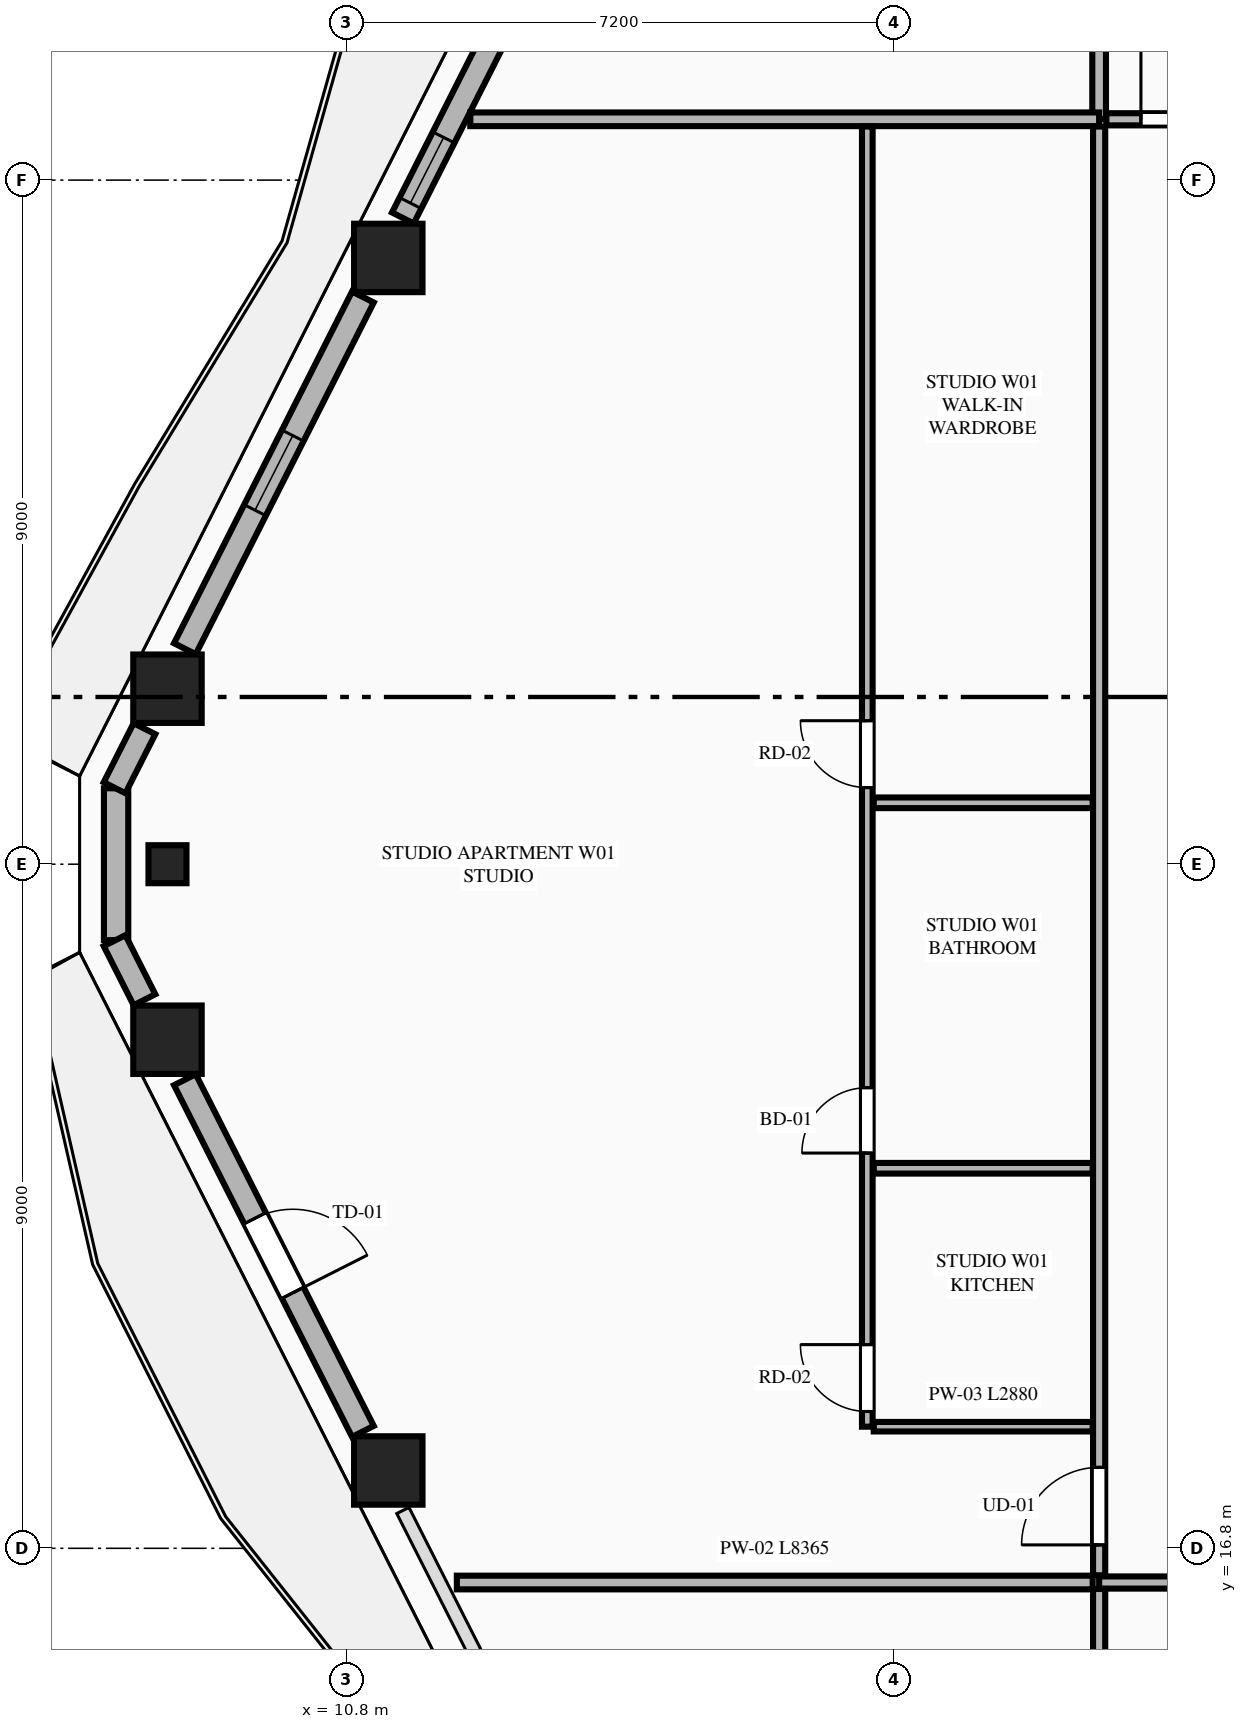
"""IFC4 building model, lengths in metres.
Left out: names, types, materials, properties, quantities, classifications, styles, units other than length and angle.
Written with IfcOpenShell. Run it as: python <this file> out.ifc"""

import sys

from ifc_helpers import new_model, si_unit, direction, frame, frame_2d, origin, origin_2d, place, context, subcontext, project, spatial, rectangle, extrude, element, fill, save


model = new_model("IFC4")
c1 = context("Model", 3, precision=1e-05, world=origin(), true_north=direction((0.0, 1.0)))
c2 = subcontext(c1, "Body", "Model", "MODEL_VIEW")
j1 = project(units=[si_unit("LENGTHUNIT", "METRE"), si_unit("PLANEANGLEUNIT", "RADIAN")], contexts=[c1])
p1 = place(None, origin())
s1 = spatial("IfcSite", under=j1, at=p1, CompositionType="ELEMENT")
p2 = place(p1, origin())
s2 = spatial("IfcBuilding", under=s1, at=p2, CompositionType="ELEMENT")
p3 = place(p2, frame((0.0, 0.0, 167.7)))
s3 = spatial("IfcBuildingStorey", under=s2, at=p3, CompositionType="ELEMENT", Elevation=167.7)
for number, where, z_axis, x_axis in (
    (1, (11.348, 33.776, 0.0), (0.0, 0.0, 1.0), (1.0, 0.0, 0.0)),
    (2, (8.443, 28.109, 0.0), (0.0, 0.0, 1.0), (1.0, 0.0, 0.0)),
    (3, (8.443, 23.491, 0.0), (0.0, 0.0, 1.0), (1.0, 0.0, 0.0)),
    (4, (11.348, 17.824, 0.0), (0.0, 0.0, 1.0), (1.0, 0.0, 0.0)),
):
    element("IfcColumn", number, at=place(p3, frame(where, z_axis=z_axis, x_axis=x_axis)), inside=s3, PredefinedType="COLUMN", context=c2, shape_type="SweptSolid", body=[
        extrude(rectangle(XDim=0.9, YDim=0.9, at=origin_2d()), origin(), (0.0, 0.0, 1.0), 4.2),
    ])
p4 = place(p3, frame((8.443, 25.8, 0.0), z_axis=(0.0, 0.0, 1.0), x_axis=(0.0, -1.0, 0.0)))
e5 = element("IfcColumn", 5, at=p4, inside=s3, PredefinedType="PILASTER", context=c2, shape_type="SweptSolid", body=[
    extrude(rectangle(XDim=0.5, YDim=0.35, at=origin_2d()), origin(), (0.0, 0.0, 1.0), 4.2),
])
p5 = place(p3, frame((7.767, 26.799, 0.0), z_axis=(0.0, 0.0, 1.0), x_axis=(0.0, -1.0, 0.0)))
e6 = element("IfcWall", 6, at=p5, inside=s3, PredefinedType="STANDARD", context=c2, shape_type="SweptSolid", body=[
    extrude(rectangle(XDim=1.998, YDim=0.32, at=frame_2d((0.999, 0.0))), origin(), (0.0, 0.0, 1.0), 4.0),
])
p6 = place(p3, frame((13.982, 39.129, 0.0), z_axis=(0.0, 0.0, 1.0), x_axis=(-0.451414996529, -0.892314126812, 0.0)))
e7 = element("IfcWall", 7, at=p6, inside=s3, PredefinedType="STANDARD", context=c2, shape_type="SweptSolid", body=[
    extrude(rectangle(XDim=5.409, YDim=0.32, at=frame_2d((2.705, 0.0))), origin(), (0.0, 0.0, 1.0), 2.59),
])
p7 = place(p6, frame((1.305, 0.0, 0.0)))
e8 = element("IfcOpeningElement", 8, at=p7, cuts=e7, PredefinedType="OPENING", context=c2, shape_type="SweptSolid", body=[
    extrude(rectangle(XDim=1.1, YDim=2.25, at=frame_2d((0.55, 1.125))), frame((0.0, 0.17, 0.0), z_axis=(0.0, -1.0, 0.0), x_axis=(1.0, 0.0, 0.0)), (0.0, 0.0, 1.0), 0.34),
])
p8 = place(p6, frame((4.222, 0.0, 0.75)))
e9 = element("IfcOpeningElement", 9, at=p8, cuts=e7, PredefinedType="OPENING", context=c2, shape_type="SweptSolid", body=[
    extrude(rectangle(XDim=0.968, YDim=1.56, at=frame_2d((0.484, 0.78))), frame((0.0, 0.17, 0.0), z_axis=(0.0, -1.0, 0.0), x_axis=(1.0, 0.0, 0.0)), (0.0, 0.0, 1.0), 0.34),
])
p9 = place(p3, frame((11.014, 33.262, 0.0), z_axis=(0.0, 0.0, 1.0), x_axis=(-0.451577146935, -0.892232077638, 0.0)))
e10 = element("IfcWall", 10, at=p9, inside=s3, PredefinedType="STANDARD", context=c2, shape_type="SweptSolid", body=[
    extrude(rectangle(XDim=5.186, YDim=0.32, at=frame_2d((2.593, 0.0))), origin(), (0.0, 0.0, 1.0), 2.59),
])
p10 = place(p9, frame((2.043, 0.0, 0.75)))
e11 = element("IfcOpeningElement", 11, at=p10, cuts=e10, PredefinedType="OPENING", context=c2, shape_type="SweptSolid", body=[
    extrude(rectangle(XDim=1.1, YDim=1.69, at=frame_2d((0.55, 0.845))), frame((0.0, 0.17, 0.0), z_axis=(0.0, -1.0, 0.0), x_axis=(1.0, 0.0, 0.0)), (0.0, 0.0, 1.0), 0.34),
])
p11 = place(p3, frame((8.14, 27.583, 0.0), z_axis=(0.0, 0.0, 1.0), x_axis=(-0.451134636701, -0.892455903431, 0.0)))
e12 = element("IfcWall", 12, at=p11, inside=s3, PredefinedType="STANDARD", context=c2, shape_type="SweptSolid", body=[
    extrude(rectangle(XDim=0.871, YDim=0.32, at=frame_2d((0.436, 0.0))), origin(), (0.0, 0.0, 1.0), 4.0),
])
p12 = place(p3, frame((7.747, 24.794, 0.0), z_axis=(0.0, 0.0, 1.0), x_axis=(0.451247548119, -0.892398817971, 0.0)))
e13 = element("IfcWall", 13, at=p12, inside=s3, PredefinedType="STANDARD", context=c2, shape_type="SweptSolid", body=[
    extrude(rectangle(XDim=0.871, YDim=0.32, at=frame_2d((0.435, 0.0))), origin(), (0.0, 0.0, 1.0), 4.0),
])
p13 = place(p3, frame((8.672, 22.965, 0.0), z_axis=(0.0, 0.0, 1.0), x_axis=(0.451558179147, -0.892241677375, 0.0)))
e14 = element("IfcWall", 14, at=p13, inside=s3, PredefinedType="STANDARD", context=c2, shape_type="SweptSolid", body=[
    extrude(rectangle(XDim=5.186, YDim=0.32, at=frame_2d((2.593, 0.0))), origin(), (0.0, 0.0, 1.0), 2.59),
])
p14 = place(p13, frame((2.043, 0.0, 0.0)))
e15 = element("IfcOpeningElement", 15, at=p14, cuts=e14, PredefinedType="OPENING", context=c2, shape_type="SweptSolid", body=[
    extrude(rectangle(XDim=1.1, YDim=2.25, at=frame_2d((0.55, 1.125))), frame((0.0, 0.17, 0.0), z_axis=(0.0, -1.0, 0.0), x_axis=(1.0, 0.0, 0.0)), (0.0, 0.0, 1.0), 0.34),
])
p15 = place(p3, frame((20.7, 16.35, 0.0), z_axis=(0.0, 0.0, 1.0), x_axis=(1.0, 0.0, 0.0)))
e16 = element("IfcWall", 16, at=p15, inside=s3, PredefinedType="PARTITIONING", context=c2, shape_type="SweptSolid", body=[
    extrude(rectangle(XDim=23.4, YDim=0.16, at=frame_2d((11.7, 0.0))), origin(), (0.0, 0.0, 1.0), 4.0),
])
p16 = place(p15, frame((8.518, 0.0, 0.0)))
e17 = element("IfcOpeningElement", 17, at=p16, cuts=e16, PredefinedType="OPENING", context=c2, shape_type="SweptSolid", body=[
    extrude(rectangle(XDim=1.35, YDim=2.35, at=frame_2d((0.675, 1.175))), frame((0.0, 0.09, 0.0), z_axis=(0.0, -1.0, 0.0), x_axis=(1.0, 0.0, 0.0)), (0.0, 0.0, 1.0), 0.18),
])
p17 = place(p15, frame((21.35, 0.0, 0.0)))
e18 = element("IfcOpeningElement", 18, at=p17, cuts=e16, PredefinedType="OPENING", context=c2, shape_type="SweptSolid", body=[
    extrude(rectangle(XDim=1.35, YDim=2.35, at=frame_2d((0.675, 1.175))), frame((0.0, 0.09, 0.0), z_axis=(0.0, -1.0, 0.0), x_axis=(1.0, 0.0, 0.0)), (0.0, 0.0, 1.0), 0.18),
])
p18 = place(p3, frame((20.7, 4.015, 0.0), z_axis=(0.0, 0.0, 1.0), x_axis=(0.0, 1.0, 0.0)))
e19 = element("IfcWall", 19, at=p18, inside=s3, PredefinedType="PARTITIONING", context=c2, shape_type="SweptSolid", body=[
    extrude(rectangle(XDim=12.25, YDim=0.16, at=frame_2d((6.125, 0.0))), origin(), (0.0, 0.0, 1.0), 4.0),
])
p19 = place(p3, frame((20.7, 35.6, 0.0), z_axis=(0.0, 0.0, 1.0), x_axis=(0.0, 1.0, 0.0)))
e20 = element("IfcWall", 20, at=p19, inside=s3, PredefinedType="PARTITIONING", context=c2, shape_type="SweptSolid", body=[
    extrude(rectangle(XDim=11.985, YDim=0.18, at=frame_2d((5.992, 0.0))), origin(), (0.0, 0.0, 1.0), 4.0),
])
p20 = place(p3, frame((20.795, 35.6, 0.0), z_axis=(0.0, 0.0, 1.0), x_axis=(1.0, 0.0, 0.0)))
e21 = element("IfcWall", 21, at=p20, inside=s3, PredefinedType="PARTITIONING", context=c2, shape_type="SweptSolid", body=[
    extrude(rectangle(XDim=7.678, YDim=0.16, at=frame_2d((3.839, 0.0))), origin(), (0.0, 0.0, 1.0), 4.0),
])
p21 = place(p20, frame((0.455, 0.0, 0.0)))
e22 = element("IfcOpeningElement", 22, at=p21, cuts=e21, PredefinedType="OPENING", context=c2, shape_type="SweptSolid", body=[
    extrude(rectangle(XDim=1.02, YDim=2.25, at=frame_2d((0.51, 1.125))), frame((0.0, 0.09, 0.0), z_axis=(0.0, -1.0, 0.0), x_axis=(1.0, 0.0, 0.0)), (0.0, 0.0, 1.0), 0.18),
])
p22 = place(p3, frame((12.25, 16.35, 0.0), z_axis=(0.0, 0.0, 1.0), x_axis=(1.0, 0.0, 0.0)))
e23 = element("IfcWall", 23, at=p22, inside=s3, PredefinedType="PARTITIONING", context=c2, shape_type="SweptSolid", body=[
    extrude(rectangle(XDim=8.365, YDim=0.18, at=frame_2d((4.183, 0.0))), origin(), (0.0, 0.0, 1.0), 4.0),
])
p23 = place(p3, frame((12.427, 35.6, 0.0), z_axis=(0.0, 0.0, 1.0), x_axis=(1.0, 0.0, 0.0)))
e24 = element("IfcWall", 24, at=p23, inside=s3, PredefinedType="PARTITIONING", context=c2, shape_type="SweptSolid", body=[
    extrude(rectangle(XDim=8.273, YDim=0.18, at=frame_2d((4.136, 0.0))), origin(), (0.0, 0.0, 1.0), 4.0),
])
p24 = place(p3, frame((20.7, 16.445, 0.0), z_axis=(0.0, 0.0, 1.0), x_axis=(0.0, 1.0, 0.0)))
e25 = element("IfcWall", 25, at=p24, inside=s3, PredefinedType="PARTITIONING", context=c2, shape_type="SweptSolid", body=[
    extrude(rectangle(XDim=19.06, YDim=0.16, at=frame_2d((9.53, 0.0))), origin(), (0.0, 0.0, 1.0), 4.0),
])
p25 = place(p24, frame((0.4, 0.0, 0.0)))
e26 = element("IfcOpeningElement", 26, at=p25, cuts=e25, PredefinedType="OPENING", context=c2, shape_type="SweptSolid", body=[
    extrude(rectangle(XDim=1.02, YDim=2.25, at=frame_2d((0.51, 1.125))), frame((0.0, 0.09, 0.0), z_axis=(0.0, -1.0, 0.0), x_axis=(1.0, 0.0, 0.0)), (0.0, 0.0, 1.0), 0.18),
])
p26 = place(p3, frame((17.735, 18.4, 0.0), z_axis=(0.0, 0.0, 1.0), x_axis=(1.0, 0.0, 0.0)))
e27 = element("IfcWall", 27, at=p26, inside=s3, PredefinedType="PARTITIONING", context=c2, shape_type="SweptSolid", body=[
    extrude(rectangle(XDim=2.88, YDim=0.125, at=frame_2d((1.44, 0.0))), origin(), (0.0, 0.0, 1.0), 2.59),
])
p27 = place(p3, frame((17.65, 18.4, 0.0), z_axis=(0.0, 0.0, 1.0), x_axis=(0.0, 1.0, 0.0)))
e28 = element("IfcWall", 28, at=p27, inside=s3, PredefinedType="PLUMBINGWALL", context=c2, shape_type="SweptSolid", body=[
    extrude(rectangle(XDim=17.105, YDim=0.14, at=frame_2d((8.552, 0.0))), origin(), (0.0, 0.0, 1.0), 4.0),
])
p28 = place(p27, frame((3.6, 0.0, 0.0)))
e29 = element("IfcOpeningElement", 29, at=p28, cuts=e28, PredefinedType="OPENING", context=c2, shape_type="SweptSolid", body=[
    extrude(rectangle(XDim=0.86, YDim=2.1, at=frame_2d((0.43, 1.05))), frame((0.0, 0.08, 0.0), z_axis=(0.0, -1.0, 0.0), x_axis=(1.0, 0.0, 0.0)), (0.0, 0.0, 1.0), 0.16),
])
p29 = place(p27, frame((8.408, 0.0, 0.0)))
e30 = element("IfcOpeningElement", 30, at=p29, cuts=e28, PredefinedType="OPENING", context=c2, shape_type="SweptSolid", body=[
    extrude(rectangle(XDim=0.88, YDim=2.15, at=frame_2d((0.44, 1.075))), frame((0.0, 0.08, 0.0), z_axis=(0.0, -1.0, 0.0), x_axis=(1.0, 0.0, 0.0)), (0.0, 0.0, 1.0), 0.16),
])
p30 = place(p27, frame((0.2, 0.0, 0.0)))
e31 = element("IfcOpeningElement", 31, at=p30, cuts=e28, PredefinedType="OPENING", context=c2, shape_type="SweptSolid", body=[
    extrude(rectangle(XDim=0.88, YDim=2.15, at=frame_2d((0.44, 1.075))), frame((0.0, 0.08, 0.0), z_axis=(0.0, -1.0, 0.0), x_axis=(1.0, 0.0, 0.0)), (0.0, 0.0, 1.0), 0.16),
])
for number, where, z_axis, x_axis in (
    (32, (17.735, 21.8, 0.0), (0.0, 0.0, 1.0), (1.0, 0.0, 0.0)),
    (33, (17.735, 26.608, 0.0), (0.0, 0.0, 1.0), (1.0, 0.0, 0.0)),
):
    element("IfcWall", number, at=place(p3, frame(where, z_axis=z_axis, x_axis=x_axis)), inside=s3, PredefinedType="PLUMBINGWALL", context=c2, shape_type="SweptSolid", body=[
        extrude(rectangle(XDim=2.88, YDim=0.14, at=frame_2d((1.44, 0.0))), origin(), (0.0, 0.0, 1.0), 4.0),
    ])
p31 = place(p10, origin())
e34 = element("IfcWindow", 34, at=p31, inside=s3, PartitioningType="SINGLE_PANEL", PredefinedType="WINDOW", context=c2, shape_type="SweptSolid", body=[
    extrude(rectangle(XDim=1.1, YDim=1.69, at=frame_2d((0.55, 0.845))), frame((0.0, 0.03, 0.0), z_axis=(0.0, -1.0, 0.0), x_axis=(1.0, 0.0, 0.0)), (0.0, 0.0, 1.0), 0.06),
])
fill(e11, e34)
p32 = place(p14, origin())
e35 = element("IfcDoor", 35, at=p32, inside=s3, OperationType="SINGLE_SWING_RIGHT", PredefinedType="DOOR", context=c2, shape_type="SweptSolid", body=[
    extrude(rectangle(XDim=1.1, YDim=2.25, at=frame_2d((0.55, 1.125))), frame((0.0, 0.025, 0.0), z_axis=(0.0, -1.0, 0.0), x_axis=(1.0, 0.0, 0.0)), (0.0, 0.0, 1.0), 0.05),
])
fill(e15, e35)
p33 = place(p21, origin())
e36 = element("IfcDoor", 36, at=p33, inside=s3, OperationType="SINGLE_SWING_LEFT", PredefinedType="DOOR", context=c2, shape_type="SweptSolid", body=[
    extrude(rectangle(XDim=1.02, YDim=2.25, at=frame_2d((0.51, 1.125))), frame((0.0, 0.025, 0.0), z_axis=(0.0, -1.0, 0.0), x_axis=(1.0, 0.0, 0.0)), (0.0, 0.0, 1.0), 0.05),
])
fill(e22, e36)
p34 = place(p28, origin())
e37 = element("IfcDoor", 37, at=p34, inside=s3, OperationType="SINGLE_SWING_LEFT", PredefinedType="DOOR", context=c2, shape_type="SweptSolid", body=[
    extrude(rectangle(XDim=0.86, YDim=2.1, at=frame_2d((0.43, 1.05))), frame((0.0, 0.025, 0.0), z_axis=(0.0, -1.0, 0.0), x_axis=(1.0, 0.0, 0.0)), (0.0, 0.0, 1.0), 0.05),
])
fill(e29, e37)
p35 = place(p29, origin())
e38 = element("IfcDoor", 38, at=p35, inside=s3, OperationType="SINGLE_SWING_RIGHT", PredefinedType="DOOR", context=c2, shape_type="SweptSolid", body=[
    extrude(rectangle(XDim=0.88, YDim=2.15, at=frame_2d((0.44, 1.075))), frame((0.0, 0.025, 0.0), z_axis=(0.0, -1.0, 0.0), x_axis=(1.0, 0.0, 0.0)), (0.0, 0.0, 1.0), 0.05),
])
fill(e30, e38)
p36 = place(p25, origin())
e39 = element("IfcDoor", 39, at=p36, inside=s3, OperationType="SINGLE_SWING_LEFT", PredefinedType="DOOR", context=c2, shape_type="SweptSolid", body=[
    extrude(rectangle(XDim=1.02, YDim=2.25, at=frame_2d((0.51, 1.125))), frame((0.0, 0.025, 0.0), z_axis=(0.0, -1.0, 0.0), x_axis=(1.0, 0.0, 0.0)), (0.0, 0.0, 1.0), 0.05),
])
fill(e26, e39)
p37 = place(p30, origin())
e40 = element("IfcDoor", 40, at=p37, inside=s3, OperationType="SINGLE_SWING_RIGHT", PredefinedType="DOOR", context=c2, shape_type="SweptSolid", body=[
    extrude(rectangle(XDim=0.88, YDim=2.15, at=frame_2d((0.44, 1.075))), frame((0.0, 0.025, 0.0), z_axis=(0.0, -1.0, 0.0), x_axis=(1.0, 0.0, 0.0)), (0.0, 0.0, 1.0), 0.05),
])
fill(e31, e40)
p38 = place(p8, origin())
e41 = element("IfcWindow", 41, at=p38, inside=s3, PartitioningType="SINGLE_PANEL", PredefinedType="WINDOW", context=c2, shape_type="SweptSolid", body=[
    extrude(rectangle(XDim=0.968, YDim=1.56, at=frame_2d((0.484, 0.78))), frame((0.0, 0.03, 0.0), z_axis=(0.0, -1.0, 0.0), x_axis=(1.0, 0.0, 0.0)), (0.0, 0.0, 1.0), 0.06),
])
fill(e9, e41)
save(model, sys.argv[1])
